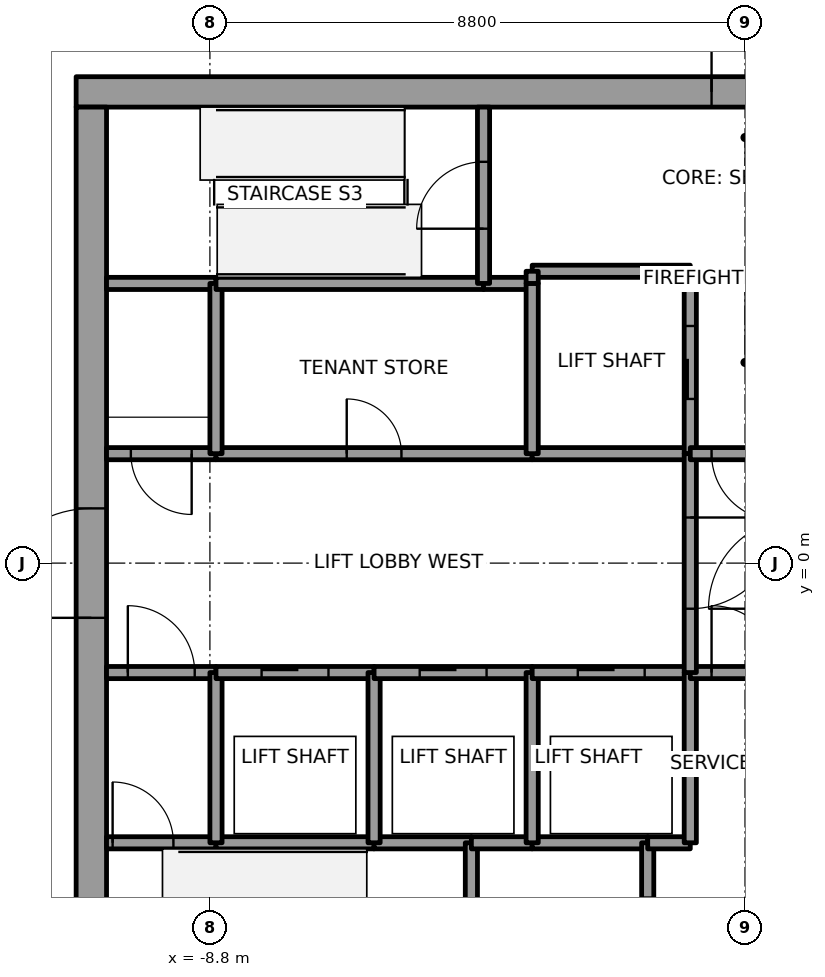
"""IFC4 building model, lengths in metres.
Left out: names, types, materials, properties, quantities, classifications, styles, units other than length and angle.
Written with IfcOpenShell. Run it as: python <this file> out.ifc"""

import sys

from ifc_helpers import new_model, si_unit, direction, frame, frame_2d, origin, place, context, subcontext, project, spatial, rectangle, extrude, element, fill, save


model = new_model("IFC4")
c1 = context("Model", 3, precision=1e-05, world=origin(), true_north=direction((0.0, 1.0)))
c2 = subcontext(c1, "Body", "Model", "MODEL_VIEW")
j1 = project(units=[si_unit("LENGTHUNIT", "METRE"), si_unit("PLANEANGLEUNIT", "RADIAN")], contexts=[c1])
p1 = place(None, origin())
s1 = spatial("IfcSite", under=j1, at=p1, CompositionType="ELEMENT")
p2 = place(p1, origin())
s2 = spatial("IfcBuilding", under=s1, at=p2, CompositionType="ELEMENT")
p3 = place(p2, frame((0.0, 0.0, 283.0)))
s3 = spatial("IfcBuildingStorey", under=s2, at=p3, CompositionType="ELEMENT", Elevation=283.0)
p4 = place(p3, frame((-11.0, 7.75, 0.0), z_axis=(0.0, 0.0, 1.0), x_axis=(1.0, 0.0, 0.0)))
e1 = element("IfcWall", 1, at=p4, inside=s3, PredefinedType="SHEAR", context=c2, shape_type="SweptSolid", body=[
    extrude(rectangle(XDim=22.0, YDim=0.5, at=frame_2d((11.0, 0.0))), origin(), (0.0, 0.0, 1.0), 4.0),
])
p5 = place(p4, frame((10.45, 0.0, 0.0)))
e2 = element("IfcOpeningElement", 2, at=p5, cuts=e1, PredefinedType="OPENING", context=c2, shape_type="SweptSolid", body=[
    extrude(rectangle(XDim=1.1, YDim=2.1, at=frame_2d((0.55, 1.05))), frame((0.0, 0.25, 0.0), z_axis=(0.0, -1.0, 0.0), x_axis=(1.0, 0.0, 0.0)), (0.0, 0.0, 1.0), 0.5),
])
p6 = place(p3, frame((-10.75, -7.5, 0.0), z_axis=(0.0, 0.0, 1.0), x_axis=(0.0, 1.0, 0.0)))
e3 = element("IfcWall", 3, at=p6, inside=s3, PredefinedType="SHEAR", context=c2, shape_type="SweptSolid", body=[
    extrude(rectangle(XDim=15.0, YDim=0.5, at=frame_2d((7.5, 0.0))), origin(), (0.0, 0.0, 1.0), 4.0),
])
p7 = place(p6, frame((6.6, 0.0, 0.0)))
e4 = element("IfcOpeningElement", 4, at=p7, cuts=e3, PredefinedType="OPENING", context=c2, shape_type="SweptSolid", body=[
    extrude(rectangle(XDim=1.8, YDim=2.1, at=frame_2d((0.9, 1.05))), frame((0.0, 0.25, 0.0), z_axis=(0.0, -1.0, 0.0), x_axis=(1.0, 0.0, 0.0)), (0.0, 0.0, 1.0), 0.5),
])
p8 = place(p3, frame((-10.5, -4.6, 0.0), z_axis=(0.0, 0.0, 1.0), x_axis=(1.0, 0.0, 0.0)))
e5 = element("IfcWall", 5, at=p8, inside=s3, PredefinedType="SOLIDWALL", context=c2, shape_type="SweptSolid", body=[
    extrude(rectangle(XDim=1.8, YDim=0.2, at=frame_2d((0.9, 0.0))), origin(), (0.0, 0.0, 1.0), 3.85),
])
p9 = place(p8, frame((0.1, 0.0, 0.0)))
e6 = element("IfcOpeningElement", 6, at=p9, cuts=e5, PredefinedType="OPENING", context=c2, shape_type="SweptSolid", body=[
    extrude(rectangle(XDim=1.0, YDim=2.1, at=frame_2d((0.5, 1.05))), frame((0.0, 0.1, 0.0), z_axis=(0.0, -1.0, 0.0), x_axis=(1.0, 0.0, 0.0)), (0.0, 0.0, 1.0), 0.2),
])
p10 = place(p3, frame((-10.5, -1.8, 0.0), z_axis=(0.0, 0.0, 1.0), x_axis=(1.0, 0.0, 0.0)))
e7 = element("IfcWall", 7, at=p10, inside=s3, PredefinedType="SOLIDWALL", context=c2, shape_type="SweptSolid", body=[
    extrude(rectangle(XDim=1.8, YDim=0.2, at=frame_2d((0.9, 0.0))), origin(), (0.0, 0.0, 1.0), 3.85),
])
p11 = place(p10, frame((0.35, 0.0, 0.0)))
e8 = element("IfcOpeningElement", 8, at=p11, cuts=e7, PredefinedType="OPENING", context=c2, shape_type="SweptSolid", body=[
    extrude(rectangle(XDim=1.1, YDim=2.1, at=frame_2d((0.55, 1.05))), frame((0.0, 0.1, 0.0), z_axis=(0.0, -1.0, 0.0), x_axis=(1.0, 0.0, 0.0)), (0.0, 0.0, 1.0), 0.2),
])
p12 = place(p3, frame((-8.7, 1.8, 0.0), z_axis=(0.0, 0.0, 1.0), x_axis=(-1.0, 0.0, 0.0)))
e9 = element("IfcWall", 9, at=p12, inside=s3, PredefinedType="SOLIDWALL", context=c2, shape_type="SweptSolid", body=[
    extrude(rectangle(XDim=1.8, YDim=0.2, at=frame_2d((0.9, 0.0))), origin(), (0.0, 0.0, 1.0), 3.85),
])
p13 = place(p12, frame((0.4, 0.0, 0.0)))
e10 = element("IfcOpeningElement", 10, at=p13, cuts=e9, PredefinedType="OPENING", context=c2, shape_type="SweptSolid", body=[
    extrude(rectangle(XDim=1.0, YDim=2.1, at=frame_2d((0.5, 1.05))), frame((0.0, 0.1, 0.0), z_axis=(0.0, -1.0, 0.0), x_axis=(1.0, 0.0, 0.0)), (0.0, 0.0, 1.0), 0.2),
])
p14 = place(p3, frame((-8.7, 4.6, 0.0), z_axis=(0.0, 0.0, 1.0), x_axis=(-1.0, 0.0, 0.0)))
e11 = element("IfcWall", 11, at=p14, inside=s3, PredefinedType="SOLIDWALL", context=c2, shape_type="SweptSolid", body=[
    extrude(rectangle(XDim=1.8, YDim=0.2, at=frame_2d((0.9, 0.0))), origin(), (0.0, 0.0, 1.0), 3.85),
])
p15 = place(p3, frame((-8.7, -4.6, 0.0), z_axis=(0.0, 0.0, 1.0), x_axis=(1.0, 0.0, 0.0)))
e12 = element("IfcWall", 12, at=p15, inside=s3, PredefinedType="SOLIDWALL", context=c2, shape_type="SweptSolid", body=[
    extrude(rectangle(XDim=2.6, YDim=0.2, at=frame_2d((1.3, 0.0))), origin(), (0.0, 0.0, 1.0), 3.85),
])
p16 = place(p3, frame((-8.7, -4.6, 0.0), z_axis=(0.0, 0.0, 1.0), x_axis=(0.0, 1.0, 0.0)))
e13 = element("IfcWall", 13, at=p16, inside=s3, PredefinedType="SOLIDWALL", context=c2, shape_type="SweptSolid", body=[
    extrude(rectangle(XDim=2.8, YDim=0.2, at=frame_2d((1.4, 0.0))), origin(), (0.0, 0.0, 1.0), 3.85),
])
p17 = place(p3, frame((-8.7, -1.8, 0.0), z_axis=(0.0, 0.0, 1.0), x_axis=(1.0, 0.0, 0.0)))
e14 = element("IfcWall", 14, at=p17, inside=s3, PredefinedType="SOLIDWALL", context=c2, shape_type="SweptSolid", body=[
    extrude(rectangle(XDim=2.6, YDim=0.2, at=frame_2d((1.3, 0.0))), origin(), (0.0, 0.0, 1.0), 3.85),
])
p18 = place(p17, frame((0.75, 0.0, 0.0)))
e15 = element("IfcOpeningElement", 15, at=p18, cuts=e14, PredefinedType="OPENING", context=c2, shape_type="SweptSolid", body=[
    extrude(rectangle(XDim=1.1, YDim=2.1, at=frame_2d((0.55, 1.05))), frame((0.0, 0.1, 0.0), z_axis=(0.0, -1.0, 0.0), x_axis=(1.0, 0.0, 0.0)), (0.0, 0.0, 1.0), 0.2),
])
p19 = place(p3, frame((-8.7, 1.8, 0.0), z_axis=(0.0, 0.0, 1.0), x_axis=(1.0, 0.0, 0.0)))
e16 = element("IfcWall", 16, at=p19, inside=s3, PredefinedType="SOLIDWALL", context=c2, shape_type="SweptSolid", body=[
    extrude(rectangle(XDim=5.2, YDim=0.2, at=frame_2d((2.6, 0.0))), origin(), (0.0, 0.0, 1.0), 3.85),
])
p20 = place(p19, frame((2.15, 0.0, 0.0)))
e17 = element("IfcOpeningElement", 17, at=p20, cuts=e16, PredefinedType="OPENING", context=c2, shape_type="SweptSolid", body=[
    extrude(rectangle(XDim=0.9, YDim=2.1, at=frame_2d((0.45, 1.05))), frame((0.0, 0.1, 0.0), z_axis=(0.0, -1.0, 0.0), x_axis=(1.0, 0.0, 0.0)), (0.0, 0.0, 1.0), 0.2),
])
p21 = place(p3, frame((-8.7, 4.6, 0.0), z_axis=(0.0, 0.0, 1.0), x_axis=(0.0, -1.0, 0.0)))
e18 = element("IfcWall", 18, at=p21, inside=s3, PredefinedType="SOLIDWALL", context=c2, shape_type="SweptSolid", body=[
    extrude(rectangle(XDim=2.8, YDim=0.2, at=frame_2d((1.4, 0.0))), origin(), (0.0, 0.0, 1.0), 3.85),
])
p22 = place(p3, frame((-4.3, 4.6, 0.0), z_axis=(0.0, 0.0, 1.0), x_axis=(-1.0, 0.0, 0.0)))
e19 = element("IfcWall", 19, at=p22, inside=s3, PredefinedType="SOLIDWALL", context=c2, shape_type="SweptSolid", body=[
    extrude(rectangle(XDim=4.4, YDim=0.2, at=frame_2d((2.2, 0.0))), origin(), (0.0, 0.0, 1.0), 3.85),
])
p23 = place(p3, frame((-6.1, -4.6, 0.0), z_axis=(0.0, 0.0, 1.0), x_axis=(1.0, 0.0, 0.0)))
e20 = element("IfcWall", 20, at=p23, inside=s3, PredefinedType="SOLIDWALL", context=c2, shape_type="SweptSolid", body=[
    extrude(rectangle(XDim=1.6, YDim=0.2, at=frame_2d((0.8, 0.0))), origin(), (0.0, 0.0, 1.0), 3.85),
])
p24 = place(p3, frame((-6.1, -4.6, 0.0), z_axis=(0.0, 0.0, 1.0), x_axis=(0.0, 1.0, 0.0)))
e21 = element("IfcWall", 21, at=p24, inside=s3, PredefinedType="SOLIDWALL", context=c2, shape_type="SweptSolid", body=[
    extrude(rectangle(XDim=2.8, YDim=0.2, at=frame_2d((1.4, 0.0))), origin(), (0.0, 0.0, 1.0), 3.85),
])
p25 = place(p3, frame((-6.1, -1.8, 0.0), z_axis=(0.0, 0.0, 1.0), x_axis=(1.0, 0.0, 0.0)))
e22 = element("IfcWall", 22, at=p25, inside=s3, PredefinedType="SOLIDWALL", context=c2, shape_type="SweptSolid", body=[
    extrude(rectangle(XDim=2.6, YDim=0.2, at=frame_2d((1.3, 0.0))), origin(), (0.0, 0.0, 1.0), 3.85),
])
p26 = place(p25, frame((0.75, 0.0, 0.0)))
e23 = element("IfcOpeningElement", 23, at=p26, cuts=e22, PredefinedType="OPENING", context=c2, shape_type="SweptSolid", body=[
    extrude(rectangle(XDim=1.1, YDim=2.1, at=frame_2d((0.55, 1.05))), frame((0.0, 0.1, 0.0), z_axis=(0.0, -1.0, 0.0), x_axis=(1.0, 0.0, 0.0)), (0.0, 0.0, 1.0), 0.2),
])
p27 = place(p3, frame((-4.5, -4.6, 0.0), z_axis=(0.0, 0.0, 1.0), x_axis=(0.0, -1.0, 0.0)))
e24 = element("IfcWall", 24, at=p27, inside=s3, PredefinedType="SOLIDWALL", context=c2, shape_type="SweptSolid", body=[
    extrude(rectangle(XDim=2.9, YDim=0.2, at=frame_2d((1.45, 0.0))), origin(), (0.0, 0.0, 1.0), 3.85),
])
p28 = place(p3, frame((-4.5, -4.6, 0.0), z_axis=(0.0, 0.0, 1.0), x_axis=(1.0, 0.0, 0.0)))
e25 = element("IfcWall", 25, at=p28, inside=s3, PredefinedType="SOLIDWALL", context=c2, shape_type="SweptSolid", body=[
    extrude(rectangle(XDim=1.0, YDim=0.2, at=frame_2d((0.5, 0.0))), origin(), (0.0, 0.0, 1.0), 3.85),
])
p29 = place(p3, frame((-3.5, 4.6, 0.0), z_axis=(0.0, 0.0, 1.0), x_axis=(-1.0, 0.0, 0.0)))
e26 = element("IfcWall", 26, at=p29, inside=s3, PredefinedType="SOLIDWALL", context=c2, shape_type="SweptSolid", body=[
    extrude(rectangle(XDim=0.8, YDim=0.2, at=frame_2d((0.4, 0.0))), origin(), (0.0, 0.0, 1.0), 3.85),
])
p30 = place(p3, frame((-4.3, 4.6, 0.0), z_axis=(0.0, 0.0, 1.0), x_axis=(0.0, 1.0, 0.0)))
e27 = element("IfcWall", 27, at=p30, inside=s3, PredefinedType="SOLIDWALL", context=c2, shape_type="SweptSolid", body=[
    extrude(rectangle(XDim=2.9, YDim=0.2, at=frame_2d((1.45, 0.0))), origin(), (0.0, 0.0, 1.0), 3.85),
])
p31 = place(p30, frame((0.9, 0.0, 0.0)))
e28 = element("IfcOpeningElement", 28, at=p31, cuts=e27, PredefinedType="OPENING", context=c2, shape_type="SweptSolid", body=[
    extrude(rectangle(XDim=1.1, YDim=2.1, at=frame_2d((0.55, 1.05))), frame((0.0, 0.1, 0.0), z_axis=(0.0, -1.0, 0.0), x_axis=(1.0, 0.0, 0.0)), (0.0, 0.0, 1.0), 0.2),
])
p32 = place(p3, frame((-3.5, -4.6, 0.0), z_axis=(0.0, 0.0, 1.0), x_axis=(1.0, 0.0, 0.0)))
e29 = element("IfcWall", 29, at=p32, inside=s3, PredefinedType="SOLIDWALL", context=c2, shape_type="SweptSolid", body=[
    extrude(rectangle(XDim=1.9, YDim=0.2, at=frame_2d((0.95, 0.0))), origin(), (0.0, 0.0, 1.0), 3.85),
])
p33 = place(p3, frame((-3.5, -4.6, 0.0), z_axis=(0.0, 0.0, 1.0), x_axis=(0.0, 1.0, 0.0)))
e30 = element("IfcWall", 30, at=p33, inside=s3, PredefinedType="SOLIDWALL", context=c2, shape_type="SweptSolid", body=[
    extrude(rectangle(XDim=2.8, YDim=0.2, at=frame_2d((1.4, 0.0))), origin(), (0.0, 0.0, 1.0), 3.85),
])
p34 = place(p3, frame((-3.5, -1.8, 0.0), z_axis=(0.0, 0.0, 1.0), x_axis=(1.0, 0.0, 0.0)))
e31 = element("IfcWall", 31, at=p34, inside=s3, PredefinedType="SOLIDWALL", context=c2, shape_type="SweptSolid", body=[
    extrude(rectangle(XDim=2.6, YDim=0.2, at=frame_2d((1.3, 0.0))), origin(), (0.0, 0.0, 1.0), 3.85),
])
p35 = place(p34, frame((0.75, 0.0, 0.0)))
e32 = element("IfcOpeningElement", 32, at=p35, cuts=e31, PredefinedType="OPENING", context=c2, shape_type="SweptSolid", body=[
    extrude(rectangle(XDim=1.1, YDim=2.1, at=frame_2d((0.55, 1.05))), frame((0.0, 0.1, 0.0), z_axis=(0.0, -1.0, 0.0), x_axis=(1.0, 0.0, 0.0)), (0.0, 0.0, 1.0), 0.2),
])
p36 = place(p3, frame((-0.9, 1.8, 0.0), z_axis=(0.0, 0.0, 1.0), x_axis=(-1.0, 0.0, 0.0)))
e33 = element("IfcWall", 33, at=p36, inside=s3, PredefinedType="SOLIDWALL", context=c2, shape_type="SweptSolid", body=[
    extrude(rectangle(XDim=2.6, YDim=0.2, at=frame_2d((1.3, 0.0))), origin(), (0.0, 0.0, 1.0), 3.85),
])
p37 = place(p3, frame((-3.5, 1.8, 0.0), z_axis=(0.0, 0.0, 1.0), x_axis=(0.0, 1.0, 0.0)))
e34 = element("IfcWall", 34, at=p37, inside=s3, PredefinedType="SOLIDWALL", context=c2, shape_type="SweptSolid", body=[
    extrude(rectangle(XDim=2.8, YDim=0.2, at=frame_2d((1.4, 0.0))), origin(), (0.0, 0.0, 1.0), 3.85),
])
p38 = place(p3, frame((-0.9, 1.8, 0.0), z_axis=(0.0, 0.0, 1.0), x_axis=(0.0, 1.0, 0.0)))
e35 = element("IfcWall", 35, at=p38, inside=s3, PredefinedType="SOLIDWALL", context=c2, shape_type="SweptSolid", body=[
    extrude(rectangle(XDim=3.0, YDim=0.2, at=frame_2d((1.5, 0.0))), origin(), (0.0, 0.0, 1.0), 3.85),
])
p39 = place(p38, frame((0.9, 0.0, 0.0)))
e36 = element("IfcOpeningElement", 36, at=p39, cuts=e35, PredefinedType="OPENING", context=c2, shape_type="SweptSolid", body=[
    extrude(rectangle(XDim=1.2, YDim=2.1, at=frame_2d((0.6, 1.05))), frame((0.0, 0.1, 0.0), z_axis=(0.0, -1.0, 0.0), x_axis=(1.0, 0.0, 0.0)), (0.0, 0.0, 1.0), 0.2),
])
p40 = place(p3, frame((-0.9, 4.8, 0.0), z_axis=(0.0, 0.0, 1.0), x_axis=(-1.0, 0.0, 0.0)))
e37 = element("IfcWall", 37, at=p40, inside=s3, PredefinedType="SOLIDWALL", context=c2, shape_type="SweptSolid", body=[
    extrude(rectangle(XDim=2.6, YDim=0.2, at=frame_2d((1.3, 0.0))), origin(), (0.0, 0.0, 1.0), 3.85),
])
p41 = place(p3, frame((-3.5, 4.8, 0.0), z_axis=(0.0, 0.0, 1.0), x_axis=(0.0, -1.0, 0.0)))
e38 = element("IfcWall", 38, at=p41, inside=s3, PredefinedType="SOLIDWALL", context=c2, shape_type="SweptSolid", body=[
    extrude(rectangle(XDim=0.2, YDim=0.2, at=frame_2d((0.1, 0.0))), origin(), (0.0, 0.0, 1.0), 3.85),
])
p42 = place(p3, frame((-1.6, -7.5, 0.0), z_axis=(0.0, 0.0, 1.0), x_axis=(0.0, 1.0, 0.0)))
e39 = element("IfcWall", 39, at=p42, inside=s3, PredefinedType="SOLIDWALL", context=c2, shape_type="SweptSolid", body=[
    extrude(rectangle(XDim=2.9, YDim=0.2, at=frame_2d((1.45, 0.0))), origin(), (0.0, 0.0, 1.0), 3.85),
])
p43 = place(p42, frame((0.9, 0.0, 0.0)))
e40 = element("IfcOpeningElement", 40, at=p43, cuts=e39, PredefinedType="OPENING", context=c2, shape_type="SweptSolid", body=[
    extrude(rectangle(XDim=1.1, YDim=2.1, at=frame_2d((0.55, 1.05))), frame((0.0, 0.1, 0.0), z_axis=(0.0, -1.0, 0.0), x_axis=(1.0, 0.0, 0.0)), (0.0, 0.0, 1.0), 0.2),
])
p44 = place(p3, frame((-1.6, -4.6, 0.0), z_axis=(0.0, 0.0, 1.0), x_axis=(1.0, 0.0, 0.0)))
e41 = element("IfcWall", 41, at=p44, inside=s3, PredefinedType="SOLIDWALL", context=c2, shape_type="SweptSolid", body=[
    extrude(rectangle(XDim=0.7, YDim=0.2, at=frame_2d((0.35, 0.0))), origin(), (0.0, 0.0, 1.0), 3.85),
])
p45 = place(p3, frame((-0.9, -4.6, 0.0), z_axis=(0.0, 0.0, 1.0), x_axis=(0.0, 1.0, 0.0)))
e42 = element("IfcWall", 42, at=p45, inside=s3, PredefinedType="SOLIDWALL", context=c2, shape_type="SweptSolid", body=[
    extrude(rectangle(XDim=2.8, YDim=0.2, at=frame_2d((1.4, 0.0))), origin(), (0.0, 0.0, 1.0), 3.85),
])
p46 = place(p3, frame((-0.9, -1.8, 0.0), z_axis=(0.0, 0.0, 1.0), x_axis=(1.0, 0.0, 0.0)))
e43 = element("IfcWall", 43, at=p46, inside=s3, PredefinedType="SOLIDWALL", context=c2, shape_type="SweptSolid", body=[
    extrude(rectangle(XDim=1.8, YDim=0.2, at=frame_2d((0.9, 0.0))), origin(), (0.0, 0.0, 1.0), 3.85),
])
p47 = place(p46, frame((0.35, 0.0, 0.0)))
e44 = element("IfcOpeningElement", 44, at=p47, cuts=e43, PredefinedType="OPENING", context=c2, shape_type="SweptSolid", body=[
    extrude(rectangle(XDim=1.1, YDim=2.1, at=frame_2d((0.55, 1.05))), frame((0.0, 0.1, 0.0), z_axis=(0.0, -1.0, 0.0), x_axis=(1.0, 0.0, 0.0)), (0.0, 0.0, 1.0), 0.2),
])
p48 = place(p3, frame((-0.9, 1.8, 0.0), z_axis=(0.0, 0.0, 1.0), x_axis=(0.0, -1.0, 0.0)))
e45 = element("IfcWall", 45, at=p48, inside=s3, PredefinedType="SOLIDWALL", context=c2, shape_type="SweptSolid", body=[
    extrude(rectangle(XDim=3.6, YDim=0.2, at=frame_2d((1.8, 0.0))), origin(), (0.0, 0.0, 1.0), 3.85),
])
p49 = place(p48, frame((1.05, 0.0, 0.0)))
e46 = element("IfcOpeningElement", 46, at=p49, cuts=e45, PredefinedType="OPENING", context=c2, shape_type="SweptSolid", body=[
    extrude(rectangle(XDim=1.5, YDim=2.1, at=frame_2d((0.75, 1.05))), frame((0.0, 0.1, 0.0), z_axis=(0.0, -1.0, 0.0), x_axis=(1.0, 0.0, 0.0)), (0.0, 0.0, 1.0), 0.2),
])
p50 = place(p3, frame((0.9, 1.8, 0.0), z_axis=(0.0, 0.0, 1.0), x_axis=(-1.0, 0.0, 0.0)))
e47 = element("IfcWall", 47, at=p50, inside=s3, PredefinedType="SOLIDWALL", context=c2, shape_type="SweptSolid", body=[
    extrude(rectangle(XDim=1.8, YDim=0.2, at=frame_2d((0.9, 0.0))), origin(), (0.0, 0.0, 1.0), 3.85),
])
p51 = place(p50, frame((0.35, 0.0, 0.0)))
e48 = element("IfcOpeningElement", 48, at=p51, cuts=e47, PredefinedType="OPENING", context=c2, shape_type="SweptSolid", body=[
    extrude(rectangle(XDim=1.1, YDim=2.1, at=frame_2d((0.55, 1.05))), frame((0.0, 0.1, 0.0), z_axis=(0.0, -1.0, 0.0), x_axis=(1.0, 0.0, 0.0)), (0.0, 0.0, 1.0), 0.2),
])
p52 = place(p18, origin())
e49 = element("IfcDoor", 49, at=p52, inside=s3, OperationType="SLIDING_TO_LEFT", PredefinedType="DOOR", context=c2, shape_type="SweptSolid", body=[
    extrude(rectangle(XDim=1.1, YDim=2.1, at=frame_2d((0.55, 1.05))), frame((0.0, 0.025, 0.0), z_axis=(0.0, -1.0, 0.0), x_axis=(1.0, 0.0, 0.0)), (0.0, 0.0, 1.0), 0.05),
])
fill(e15, e49)
p53 = place(p26, origin())
e50 = element("IfcDoor", 50, at=p53, inside=s3, OperationType="SLIDING_TO_LEFT", PredefinedType="DOOR", context=c2, shape_type="SweptSolid", body=[
    extrude(rectangle(XDim=1.1, YDim=2.1, at=frame_2d((0.55, 1.05))), frame((0.0, 0.025, 0.0), z_axis=(0.0, -1.0, 0.0), x_axis=(1.0, 0.0, 0.0)), (0.0, 0.0, 1.0), 0.05),
])
fill(e23, e50)
p54 = place(p35, origin())
e51 = element("IfcDoor", 51, at=p54, inside=s3, OperationType="SLIDING_TO_LEFT", PredefinedType="DOOR", context=c2, shape_type="SweptSolid", body=[
    extrude(rectangle(XDim=1.1, YDim=2.1, at=frame_2d((0.55, 1.05))), frame((0.0, 0.025, 0.0), z_axis=(0.0, -1.0, 0.0), x_axis=(1.0, 0.0, 0.0)), (0.0, 0.0, 1.0), 0.05),
])
fill(e32, e51)
p55 = place(p39, origin())
e52 = element("IfcDoor", 52, at=p55, inside=s3, OperationType="SLIDING_TO_LEFT", PredefinedType="DOOR", context=c2, shape_type="SweptSolid", body=[
    extrude(rectangle(XDim=1.2, YDim=2.1, at=frame_2d((0.6, 1.05))), frame((0.0, 0.025, 0.0), z_axis=(0.0, -1.0, 0.0), x_axis=(1.0, 0.0, 0.0)), (0.0, 0.0, 1.0), 0.05),
])
fill(e36, e52)
p56 = place(p49, origin())
e53 = element("IfcDoor", 53, at=p56, inside=s3, OperationType="DOUBLE_DOOR_SINGLE_SWING", PredefinedType="DOOR", context=c2, shape_type="SweptSolid", body=[
    extrude(rectangle(XDim=1.5, YDim=2.1, at=frame_2d((0.75, 1.05))), frame((0.0, 0.025, 0.0), z_axis=(0.0, -1.0, 0.0), x_axis=(1.0, 0.0, 0.0)), (0.0, 0.0, 1.0), 0.05),
])
fill(e46, e53)
p57 = place(p11, origin())
e54 = element("IfcDoor", 54, at=p57, inside=s3, OperationType="SINGLE_SWING_LEFT", PredefinedType="DOOR", context=c2, shape_type="SweptSolid", body=[
    extrude(rectangle(XDim=1.1, YDim=2.1, at=frame_2d((0.55, 1.05))), frame((0.0, 0.025, 0.0), z_axis=(0.0, -1.0, 0.0), x_axis=(1.0, 0.0, 0.0)), (0.0, 0.0, 1.0), 0.05),
])
fill(e8, e54)
p58 = place(p51, origin())
e55 = element("IfcDoor", 55, at=p58, inside=s3, OperationType="SINGLE_SWING_LEFT", PredefinedType="DOOR", context=c2, shape_type="SweptSolid", body=[
    extrude(rectangle(XDim=1.1, YDim=2.1, at=frame_2d((0.55, 1.05))), frame((0.0, 0.025, 0.0), z_axis=(0.0, -1.0, 0.0), x_axis=(1.0, 0.0, 0.0)), (0.0, 0.0, 1.0), 0.05),
])
fill(e48, e55)
p59 = place(p47, origin())
e56 = element("IfcDoor", 56, at=p59, inside=s3, OperationType="SINGLE_SWING_RIGHT", PredefinedType="DOOR", context=c2, shape_type="SweptSolid", body=[
    extrude(rectangle(XDim=1.1, YDim=2.1, at=frame_2d((0.55, 1.05))), frame((0.0, 0.025, 0.0), z_axis=(0.0, -1.0, 0.0), x_axis=(1.0, 0.0, 0.0)), (0.0, 0.0, 1.0), 0.05),
])
fill(e44, e56)
p60 = place(p13, origin())
e57 = element("IfcDoor", 57, at=p60, inside=s3, OperationType="SINGLE_SWING_RIGHT", PredefinedType="DOOR", context=c2, shape_type="SweptSolid", body=[
    extrude(rectangle(XDim=1.0, YDim=2.1, at=frame_2d((0.5, 1.05))), frame((0.0, 0.025, 0.0), z_axis=(0.0, -1.0, 0.0), x_axis=(1.0, 0.0, 0.0)), (0.0, 0.0, 1.0), 0.05),
])
fill(e10, e57)
p61 = place(p9, origin())
e58 = element("IfcDoor", 58, at=p61, inside=s3, OperationType="SINGLE_SWING_LEFT", PredefinedType="DOOR", context=c2, shape_type="SweptSolid", body=[
    extrude(rectangle(XDim=1.0, YDim=2.1, at=frame_2d((0.5, 1.05))), frame((0.0, 0.025, 0.0), z_axis=(0.0, -1.0, 0.0), x_axis=(1.0, 0.0, 0.0)), (0.0, 0.0, 1.0), 0.05),
])
fill(e6, e58)
p62 = place(p31, origin())
e59 = element("IfcDoor", 59, at=p62, inside=s3, OperationType="SINGLE_SWING_RIGHT", PredefinedType="DOOR", context=c2, shape_type="SweptSolid", body=[
    extrude(rectangle(XDim=1.1, YDim=2.1, at=frame_2d((0.55, 1.05))), frame((0.0, 0.025, 0.0), z_axis=(0.0, -1.0, 0.0), x_axis=(1.0, 0.0, 0.0)), (0.0, 0.0, 1.0), 0.05),
])
fill(e28, e59)
p63 = place(p20, origin())
e60 = element("IfcDoor", 60, at=p63, inside=s3, OperationType="SINGLE_SWING_RIGHT", PredefinedType="DOOR", context=c2, shape_type="SweptSolid", body=[
    extrude(rectangle(XDim=0.9, YDim=2.1, at=frame_2d((0.45, 1.05))), frame((0.0, 0.025, 0.0), z_axis=(0.0, -1.0, 0.0), x_axis=(1.0, 0.0, 0.0)), (0.0, 0.0, 1.0), 0.05),
])
fill(e17, e60)
p64 = place(p7, origin())
e61 = element("IfcDoor", 61, at=p64, inside=s3, OperationType="DOUBLE_DOOR_SINGLE_SWING", PredefinedType="DOOR", context=c2, shape_type="SweptSolid", body=[
    extrude(rectangle(XDim=1.8, YDim=2.1, at=frame_2d((0.9, 1.05))), frame((0.0, 0.025, 0.0), z_axis=(0.0, -1.0, 0.0), x_axis=(1.0, 0.0, 0.0)), (0.0, 0.0, 1.0), 0.05),
])
fill(e4, e61)
p65 = place(p5, origin())
e62 = element("IfcDoor", 62, at=p65, inside=s3, OperationType="SINGLE_SWING_LEFT", PredefinedType="DOOR", context=c2, shape_type="SweptSolid", body=[
    extrude(rectangle(XDim=1.1, YDim=2.1, at=frame_2d((0.55, 1.05))), frame((0.0, 0.025, 0.0), z_axis=(0.0, -1.0, 0.0), x_axis=(1.0, 0.0, 0.0)), (0.0, 0.0, 1.0), 0.05),
])
fill(e2, e62)
save(model, sys.argv[1])
